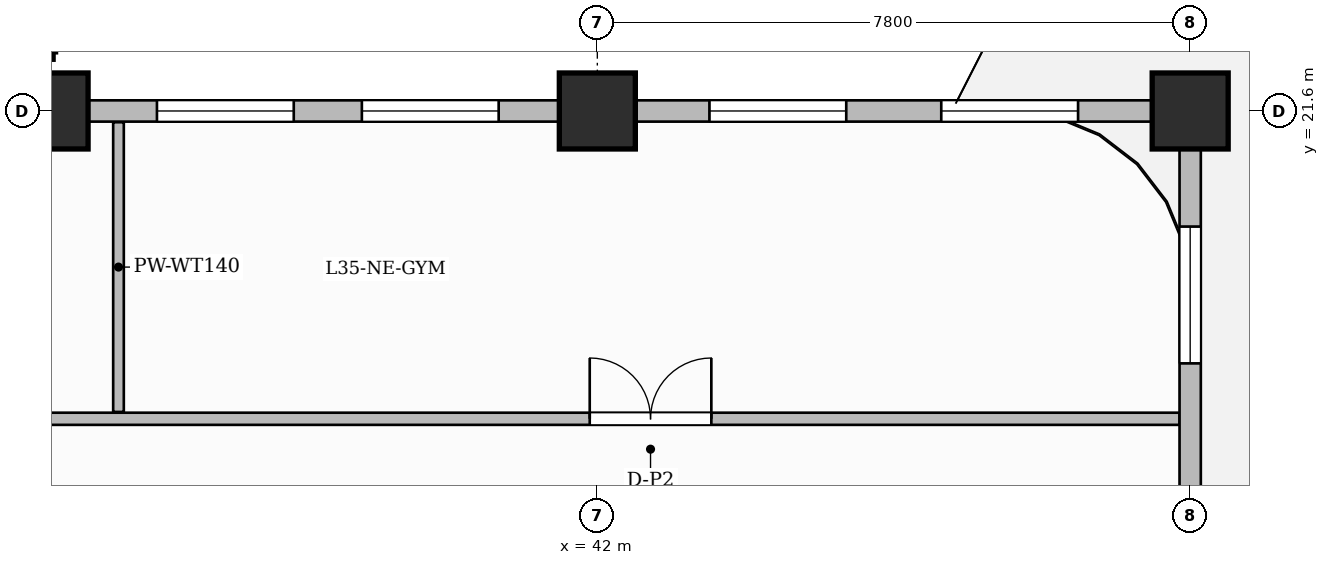
"""IFC4 building model, lengths in metres.
Left out: names, types, materials, properties, quantities, classifications, styles, units other than length and angle.
Written with IfcOpenShell. Run it as: python <this file> out.ifc"""

import sys

from ifc_helpers import new_model, si_unit, direction, frame, frame_2d, origin, origin_2d, place, context, subcontext, project, spatial, rectangle, extrude, source, transform, mapped, element, fill, save


model = new_model("IFC4")
c1 = context("Model", 3, precision=1e-05, world=origin(), true_north=direction((0.0, 1.0)))
c2 = subcontext(c1, "Body", "Model", "MODEL_VIEW")
j1 = project(units=[si_unit("LENGTHUNIT", "METRE"), si_unit("PLANEANGLEUNIT", "RADIAN")], contexts=[c1])
p1 = place(None, origin())
s1 = spatial("IfcSite", under=j1, at=p1, CompositionType="ELEMENT")
p2 = place(p1, origin())
s2 = spatial("IfcBuilding", under=s1, at=p2, CompositionType="ELEMENT")
p3 = place(p2, frame((0.0, 0.0, 141.4)))
s3 = spatial("IfcBuildingStorey", under=s2, at=p3, CompositionType="ELEMENT", Elevation=141.4)
m1 = source(origin(), c2, "Body", "SweptSolid", [
    extrude(rectangle(XDim=1.0, YDim=1.0, at=origin_2d()), origin(), (0.0, 0.0, 1.0), 3.7),
])
for number, where, z_axis, x_axis in (
    (1, (34.8, 21.6, 0.0), (0.0, 0.0, 1.0), (1.0, 0.0, 0.0)),
    (2, (42.0, 21.6, 0.0), (0.0, 0.0, 1.0), (1.0, 0.0, 0.0)),
    (3, (49.8, 21.6, 0.0), (0.0, 0.0, 1.0), (1.0, 0.0, 0.0)),
):
    element("IfcColumn", number, at=place(p3, frame(where, z_axis=z_axis, x_axis=x_axis)), inside=s3, PredefinedType="COLUMN", context=c2, shape_type="MappedRepresentation", body=[
        mapped(m1, transform((0.0, 0.0, 0.0), scale=1.0)),
    ])
p4 = place(p3, frame((32.19, 17.55, 0.0), z_axis=(0.0, 0.0, 1.0), x_axis=(1.0, 0.0, 0.0)))
e4 = element("IfcWall", 4, at=p4, inside=s3, PredefinedType="PARTITIONING", context=c2, shape_type="SweptSolid", body=[
    extrude(rectangle(XDim=17.47, YDim=0.16, at=frame_2d((8.735, 0.0))), origin(), (0.0, 0.0, 1.0), 3.4),
])
p5 = place(p4, frame((1.285, 0.0, 0.0)))
e5 = element("IfcOpeningElement", 5, at=p5, cuts=e4, PredefinedType="OPENING", context=c2, shape_type="SweptSolid", body=[
    extrude(rectangle(XDim=0.85, YDim=2.1, at=frame_2d((0.425, 1.05))), frame((0.0, 0.09, 0.0), z_axis=(0.0, -1.0, 0.0), x_axis=(1.0, 0.0, 0.0)), (0.0, 0.0, 1.0), 0.18),
])
p6 = place(p4, frame((9.71, 0.0, 0.0)))
e6 = element("IfcOpeningElement", 6, at=p6, cuts=e4, PredefinedType="OPENING", context=c2, shape_type="SweptSolid", body=[
    extrude(rectangle(XDim=1.6, YDim=2.4, at=frame_2d((0.8, 1.2))), frame((0.0, 0.09, 0.0), z_axis=(0.0, -1.0, 0.0), x_axis=(1.0, 0.0, 0.0)), (0.0, 0.0, 1.0), 0.18),
])
p7 = place(p3, frame((35.7, 17.64, 0.0), z_axis=(0.0, 0.0, 1.0), x_axis=(0.0, 1.0, 0.0)))
e7 = element("IfcWall", 7, at=p7, inside=s3, PredefinedType="PARTITIONING", context=c2, shape_type="SweptSolid", body=[
    extrude(rectangle(XDim=3.812, YDim=0.14, at=frame_2d((1.906, 0.0))), origin(), (0.0, 0.0, 1.0), 3.4),
])
p8 = place(p3, frame((49.8, 14.62, 0.0), z_axis=(0.0, 0.0, 1.0), x_axis=(0.0, 1.0, 0.0)))
e8 = element("IfcWall", 8, at=p8, inside=s3, PredefinedType="SOLIDWALL", context=c2, shape_type="SweptSolid", body=[
    extrude(rectangle(XDim=6.93, YDim=0.28, at=frame_2d((3.465, 0.0))), origin(), (0.0, 0.0, 1.0), 2.885),
])
p9 = place(p8, frame((0.42, 0.0, 0.0)))
e9 = element("IfcOpeningElement", 9, at=p9, cuts=e8, PredefinedType="OPENING", context=c2, shape_type="SweptSolid", body=[
    extrude(rectangle(XDim=1.2, YDim=2.2, at=frame_2d((0.6, 1.1))), frame((0.0, 0.15, 0.0), z_axis=(0.0, -1.0, 0.0), x_axis=(1.0, 0.0, 0.0)), (0.0, 0.0, 1.0), 0.3),
])
p10 = place(p8, frame((3.659, 0.0, 0.8)))
e10 = element("IfcOpeningElement", 10, at=p10, cuts=e8, PredefinedType="OPENING", context=c2, shape_type="SweptSolid", body=[
    extrude(rectangle(XDim=1.8, YDim=1.85, at=frame_2d((0.9, 0.925))), frame((0.0, 0.15, 0.0), z_axis=(0.0, -1.0, 0.0), x_axis=(1.0, 0.0, 0.0)), (0.0, 0.0, 1.0), 0.3),
])
p11 = place(p3, frame((34.8, 21.6, 0.0), z_axis=(0.0, 0.0, 1.0), x_axis=(1.0, 0.0, 0.0)))
e11 = element("IfcWall", 11, at=p11, inside=s3, PredefinedType="SOLIDWALL", context=c2, shape_type="SweptSolid", body=[
    extrude(rectangle(XDim=15.0, YDim=0.28, at=frame_2d((7.5, 0.0))), origin(), (0.0, 0.0, 1.0), 2.885),
])
p12 = place(p11, frame((1.406, 0.0, 0.8)))
e12 = element("IfcOpeningElement", 12, at=p12, cuts=e11, PredefinedType="OPENING", context=c2, shape_type="SweptSolid", body=[
    extrude(rectangle(XDim=1.8, YDim=1.85, at=frame_2d((0.9, 0.925))), frame((0.0, 0.15, 0.0), z_axis=(0.0, -1.0, 0.0), x_axis=(1.0, 0.0, 0.0)), (0.0, 0.0, 1.0), 0.3),
])
p13 = place(p11, frame((4.102, 0.0, 0.8)))
e13 = element("IfcOpeningElement", 13, at=p13, cuts=e11, PredefinedType="OPENING", context=c2, shape_type="SweptSolid", body=[
    extrude(rectangle(XDim=1.8, YDim=1.85, at=frame_2d((0.9, 0.925))), frame((0.0, 0.15, 0.0), z_axis=(0.0, -1.0, 0.0), x_axis=(1.0, 0.0, 0.0)), (0.0, 0.0, 1.0), 0.3),
])
p14 = place(p11, frame((8.675, 0.0, 0.8)))
e14 = element("IfcOpeningElement", 14, at=p14, cuts=e11, PredefinedType="OPENING", context=c2, shape_type="SweptSolid", body=[
    extrude(rectangle(XDim=1.8, YDim=1.85, at=frame_2d((0.9, 0.925))), frame((0.0, 0.15, 0.0), z_axis=(0.0, -1.0, 0.0), x_axis=(1.0, 0.0, 0.0)), (0.0, 0.0, 1.0), 0.3),
])
p15 = place(p11, frame((11.725, 0.0, 0.8)))
e15 = element("IfcOpeningElement", 15, at=p15, cuts=e11, PredefinedType="OPENING", context=c2, shape_type="SweptSolid", body=[
    extrude(rectangle(XDim=1.8, YDim=1.85, at=frame_2d((0.9, 0.925))), frame((0.0, 0.15, 0.0), z_axis=(0.0, -1.0, 0.0), x_axis=(1.0, 0.0, 0.0)), (0.0, 0.0, 1.0), 0.3),
])
m2 = source(origin(), c2, "Body", "SweptSolid", [
    extrude(rectangle(XDim=1.6, YDim=2.4, at=frame_2d((0.8, 1.2))), frame((0.0, 0.025, 0.0), z_axis=(0.0, -1.0, 0.0), x_axis=(1.0, 0.0, 0.0)), (0.0, 0.0, 1.0), 0.05),
])
p16 = place(p6, origin())
e16 = element("IfcDoor", 16, at=p16, inside=s3, OperationType="DOUBLE_DOOR_SINGLE_SWING", PredefinedType="DOOR", context=c2, shape_type="MappedRepresentation", body=[
    mapped(m2, transform((0.0, 0.0, 0.0), scale=1.0)),
])
fill(e6, e16)
m3 = source(origin(), c2, "Body", "SweptSolid", [
    extrude(rectangle(XDim=1.8, YDim=1.85, at=frame_2d((0.9, 0.925))), frame((0.0, 0.03, 0.0), z_axis=(0.0, -1.0, 0.0), x_axis=(1.0, 0.0, 0.0)), (0.0, 0.0, 1.0), 0.06),
])
p17 = place(p10, origin())
e17 = element("IfcWindow", 17, at=p17, inside=s3, PartitioningType="DOUBLE_PANEL_VERTICAL", PredefinedType="WINDOW", context=c2, shape_type="MappedRepresentation", body=[
    mapped(m3, transform((0.0, 0.0, 0.0), scale=1.0)),
])
fill(e10, e17)
p18 = place(p12, origin())
e18 = element("IfcWindow", 18, at=p18, inside=s3, PartitioningType="DOUBLE_PANEL_VERTICAL", PredefinedType="WINDOW", context=c2, shape_type="MappedRepresentation", body=[
    mapped(m3, transform((0.0, 0.0, 0.0), scale=1.0)),
])
fill(e12, e18)
p19 = place(p13, origin())
e19 = element("IfcWindow", 19, at=p19, inside=s3, PartitioningType="DOUBLE_PANEL_VERTICAL", PredefinedType="WINDOW", context=c2, shape_type="MappedRepresentation", body=[
    mapped(m3, transform((0.0, 0.0, 0.0), scale=1.0)),
])
fill(e13, e19)
p20 = place(p14, origin())
e20 = element("IfcWindow", 20, at=p20, inside=s3, PartitioningType="DOUBLE_PANEL_VERTICAL", PredefinedType="WINDOW", context=c2, shape_type="MappedRepresentation", body=[
    mapped(m3, transform((0.0, 0.0, 0.0), scale=1.0)),
])
fill(e14, e20)
p21 = place(p15, origin())
e21 = element("IfcWindow", 21, at=p21, inside=s3, PartitioningType="DOUBLE_PANEL_VERTICAL", PredefinedType="WINDOW", context=c2, shape_type="MappedRepresentation", body=[
    mapped(m3, transform((0.0, 0.0, 0.0), scale=1.0)),
])
fill(e15, e21)
save(model, sys.argv[1])
